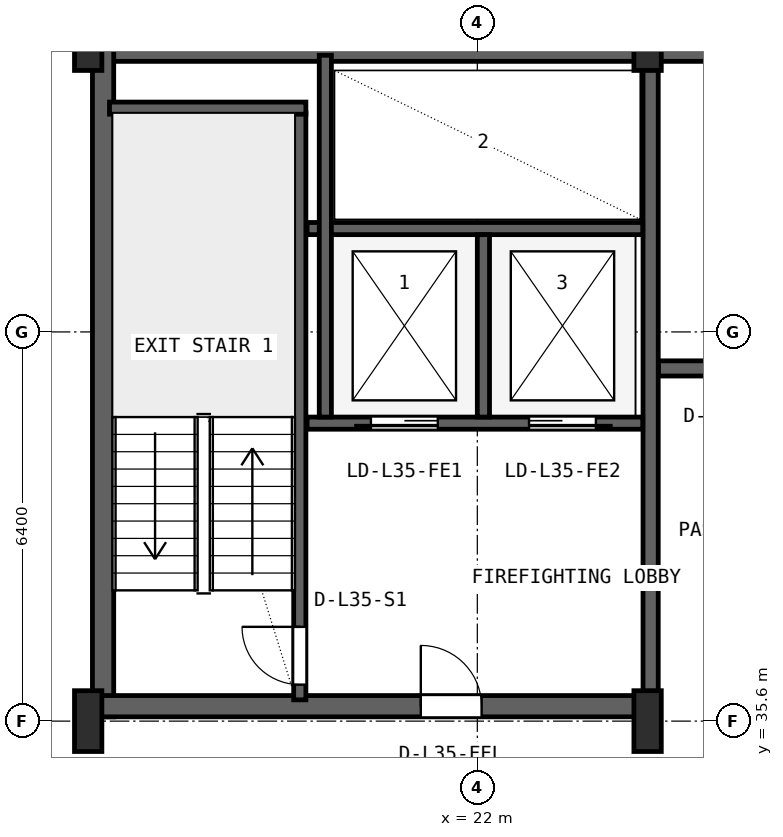
"""IFC4 building model, lengths in metres.
Left out: names, types, materials, properties, quantities, classifications, styles, units other than length and angle.
Written with IfcOpenShell. Run it as: python <this file> out.ifc"""

import sys

from ifc_helpers import new_model, si_unit, direction, frame, frame_2d, origin, origin_2d, place, context, subcontext, project, spatial, rectangle, i_section, extrude, source, transform, mapped, element, fill, save


model = new_model("IFC4")
c1 = context("Model", 3, precision=1e-05, world=origin(), true_north=direction((0.0, 1.0)))
c2 = subcontext(c1, "Body", "Model", "MODEL_VIEW")
j1 = project(units=[si_unit("LENGTHUNIT", "METRE"), si_unit("PLANEANGLEUNIT", "RADIAN")], contexts=[c1])
p1 = place(None, origin())
s1 = spatial("IfcSite", under=j1, at=p1, CompositionType="ELEMENT")
p2 = place(p1, origin())
s2 = spatial("IfcBuilding", under=s1, at=p2, CompositionType="ELEMENT")
p3 = place(p2, frame((0.0, 0.0, 145.8)))
s3 = spatial("IfcBuildingStorey", under=s2, at=p3, CompositionType="ELEMENT", Elevation=145.8)
p4 = place(p3, frame((15.6, 46.625, 0.0), z_axis=(0.0, 0.0, 1.0), x_axis=(1.0, 0.0, 0.0)))
e1 = element("IfcWall", 1, at=p4, inside=s3, PredefinedType="SHEAR", context=c2, shape_type="SweptSolid", body=[
    extrude(rectangle(XDim=36.8, YDim=0.35, at=frame_2d((18.4, 0.0))), origin(), (0.0, 0.0, 1.0), 3.55),
])
p5 = place(p3, frame((15.845, 35.67, 0.0), z_axis=(0.0, 0.0, 1.0), x_axis=(0.0, 1.0, 0.0)))
e2 = element("IfcWall", 2, at=p5, inside=s3, PredefinedType="SHEAR", context=c2, shape_type="SweptSolid", body=[
    extrude(rectangle(XDim=11.13, YDim=0.35, at=frame_2d((5.565, 0.0))), origin(), (0.0, 0.0, 1.0), 3.55),
])
p6 = place(p3, frame((15.67, 35.845, 0.0), z_axis=(0.0, 0.0, 1.0), x_axis=(1.0, 0.0, 0.0)))
e3 = element("IfcWall", 3, at=p6, inside=s3, PredefinedType="SHEAR", context=c2, shape_type="SweptSolid", body=[
    extrude(rectangle(XDim=9.13, YDim=0.35, at=frame_2d((4.565, 0.0))), origin(), (0.0, 0.0, 1.0), 3.55),
])
p7 = place(p6, frame((5.4, 0.0, 0.0)))
e4 = element("IfcOpeningElement", 4, at=p7, cuts=e3, PredefinedType="OPENING", context=c2, shape_type="SweptSolid", body=[
    extrude(rectangle(XDim=1.0, YDim=2.1, at=frame_2d((0.5, 1.05))), frame((0.0, 0.185, 0.0), z_axis=(0.0, -1.0, 0.0), x_axis=(1.0, 0.0, 0.0)), (0.0, 0.0, 1.0), 0.37),
])
m1 = source(origin(), c2, "Body", "SweptSolid", [
    extrude(i_section(OverallWidth=0.45, OverallDepth=1.0, WebThickness=0.016, FlangeThickness=0.03, FilletRadius=0.016, at=origin_2d()), origin(), (0.0, 0.0, 1.0), 3.8),
])
for number, where, z_axis, x_axis in (
    (5, (15.6, 35.6, 0.0), (0.0, 0.0, 1.0), (1.0, 0.0, 0.0)),
    (6, (15.6, 46.8, 0.0), (0.0, 0.0, 1.0), (1.0, 0.0, 0.0)),
    (7, (24.8, 35.6, 0.0), (0.0, 0.0, 1.0), (1.0, 0.0, 0.0)),
    (8, (24.8, 46.8, 0.0), (0.0, 0.0, 1.0), (1.0, 0.0, 0.0)),
):
    element("IfcColumn", number, at=place(p3, frame(where, z_axis=z_axis, x_axis=x_axis)), inside=s3, PredefinedType="COLUMN", context=c2, shape_type="MappedRepresentation", body=[
        mapped(m1, transform((0.0, 0.0, 0.0), x_axis=(1.0, 0.0, 0.0), y_axis=(0.0, 1.0, 0.0), z_axis=(0.0, 0.0, 1.0), scale=1.0)),
    ])
p8 = place(p3, frame((19.08, 35.95, 0.0), z_axis=(0.0, 0.0, 1.0), x_axis=(0.0, 1.0, 0.0)))
e9 = element("IfcWall", 9, at=p8, inside=s3, PredefinedType="SHEAR", context=c2, shape_type="SweptSolid", body=[
    extrude(rectangle(XDim=9.65, YDim=0.2, at=frame_2d((4.825, 0.0))), origin(), (0.0, 0.0, 1.0), 3.55),
])
p9 = place(p8, frame((0.25, 0.0, 0.0)))
e10 = element("IfcOpeningElement", 10, at=p9, cuts=e9, PredefinedType="OPENING", context=c2, shape_type="SweptSolid", body=[
    extrude(rectangle(XDim=0.95, YDim=2.1, at=frame_2d((0.475, 1.05))), frame((0.0, 0.11, 0.0), z_axis=(0.0, -1.0, 0.0), x_axis=(1.0, 0.0, 0.0)), (0.0, 0.0, 1.0), 0.22),
])
p10 = place(p3, frame((15.95, 45.68, 0.0), z_axis=(0.0, 0.0, 1.0), x_axis=(1.0, 0.0, 0.0)))
e11 = element("IfcWall", 11, at=p10, inside=s3, PredefinedType="SHEAR", context=c2, shape_type="SweptSolid", body=[
    extrude(rectangle(XDim=3.23, YDim=0.2, at=frame_2d((1.615, 0.0))), origin(), (0.0, 0.0, 1.0), 3.55),
])
p11 = place(p3, frame((24.85, 36.05, 0.0), z_axis=(0.0, 0.0, 1.0), x_axis=(0.0, 1.0, 0.0)))
e12 = element("IfcWall", 12, at=p11, inside=s3, PredefinedType="SHEAR", context=c2, shape_type="SweptSolid", body=[
    extrude(rectangle(XDim=10.45, YDim=0.25, at=frame_2d((5.225, 0.0))), origin(), (0.0, 0.0, 1.0), 3.55),
])
p12 = place(p3, frame((19.2, 40.5, 0.0), z_axis=(0.0, 0.0, 1.0), x_axis=(1.0, 0.0, 0.0)))
e13 = element("IfcWall", 13, at=p12, inside=s3, PredefinedType="SHEAR", context=c2, shape_type="SweptSolid", body=[
    extrude(rectangle(XDim=5.52, YDim=0.2, at=frame_2d((2.76, 0.0))), origin(), (0.0, 0.0, 1.0), 3.55),
])
p13 = place(p12, frame((1.05, 0.0, 0.0)))
e14 = element("IfcOpeningElement", 14, at=p13, cuts=e13, PredefinedType="OPENING", context=c2, shape_type="SweptSolid", body=[
    extrude(rectangle(XDim=1.1, YDim=2.18, at=frame_2d((0.55, 1.09))), frame((0.0, 0.11, 0.0), z_axis=(0.0, -1.0, 0.0), x_axis=(1.0, 0.0, 0.0)), (0.0, 0.0, 1.0), 0.22),
])
p14 = place(p12, frame((3.65, 0.0, 0.0)))
e15 = element("IfcOpeningElement", 15, at=p14, cuts=e13, PredefinedType="OPENING", context=c2, shape_type="SweptSolid", body=[
    extrude(rectangle(XDim=1.1, YDim=2.18, at=frame_2d((0.55, 1.09))), frame((0.0, 0.11, 0.0), z_axis=(0.0, -1.0, 0.0), x_axis=(1.0, 0.0, 0.0)), (0.0, 0.0, 1.0), 0.22),
])
p15 = place(p3, frame((19.2, 43.7, 0.0), z_axis=(0.0, 0.0, 1.0), x_axis=(1.0, 0.0, 0.0)))
e16 = element("IfcWall", 16, at=p15, inside=s3, PredefinedType="SHEAR", context=c2, shape_type="SweptSolid", body=[
    extrude(rectangle(XDim=5.52, YDim=0.2, at=frame_2d((2.76, 0.0))), origin(), (0.0, 0.0, 1.0), 3.55),
])
p16 = place(p3, frame((22.1, 40.6, 0.0), z_axis=(0.0, 0.0, 1.0), x_axis=(0.0, 1.0, 0.0)))
e17 = element("IfcWall", 17, at=p16, inside=s3, PredefinedType="SHEAR", context=c2, shape_type="SweptSolid", body=[
    extrude(rectangle(XDim=3.0, YDim=0.2, at=frame_2d((1.5, 0.0))), origin(), (0.0, 0.0, 1.0), 3.55),
])
p17 = place(p3, frame((19.5, 40.6, 0.0), z_axis=(0.0, 0.0, 1.0), x_axis=(0.0, 1.0, 0.0)))
e18 = element("IfcWall", 18, at=p17, inside=s3, PredefinedType="SHEAR", context=c2, shape_type="SweptSolid", body=[
    extrude(rectangle(XDim=5.95, YDim=0.2, at=frame_2d((2.975, 0.0))), origin(), (0.0, 0.0, 1.0), 3.55),
])
p18 = place(p3, frame((24.98, 41.4, 0.0), z_axis=(0.0, 0.0, 1.0), x_axis=(1.0, 0.0, 0.0)))
e19 = element("IfcWall", 19, at=p18, inside=s3, PredefinedType="SHEAR", context=c2, shape_type="SweptSolid", body=[
    extrude(rectangle(XDim=23.82, YDim=0.25, at=frame_2d((11.91, 0.0))), origin(), (0.0, 0.0, 1.0), 3.55),
])
p19 = place(p18, frame((8.87, 0.0, 0.0)))
e20 = element("IfcOpeningElement", 20, at=p19, cuts=e19, PredefinedType="OPENING", context=c2, shape_type="SweptSolid", body=[
    extrude(rectangle(XDim=1.1, YDim=2.18, at=frame_2d((0.55, 1.09))), frame((0.0, 0.135, 0.0), z_axis=(0.0, -1.0, 0.0), x_axis=(1.0, 0.0, 0.0)), (0.0, 0.0, 1.0), 0.27),
])
p20 = place(p18, frame((11.47, 0.0, 0.0)))
e21 = element("IfcOpeningElement", 21, at=p20, cuts=e19, PredefinedType="OPENING", context=c2, shape_type="SweptSolid", body=[
    extrude(rectangle(XDim=1.1, YDim=2.18, at=frame_2d((0.55, 1.09))), frame((0.0, 0.135, 0.0), z_axis=(0.0, -1.0, 0.0), x_axis=(1.0, 0.0, 0.0)), (0.0, 0.0, 1.0), 0.27),
])
p21 = place(p18, frame((14.07, 0.0, 0.0)))
e22 = element("IfcOpeningElement", 22, at=p21, cuts=e19, PredefinedType="OPENING", context=c2, shape_type="SweptSolid", body=[
    extrude(rectangle(XDim=1.1, YDim=2.18, at=frame_2d((0.55, 1.09))), frame((0.0, 0.135, 0.0), z_axis=(0.0, -1.0, 0.0), x_axis=(1.0, 0.0, 0.0)), (0.0, 0.0, 1.0), 0.27),
])
p22 = place(p18, frame((0.96, 0.0, 0.0)))
e23 = element("IfcOpeningElement", 23, at=p22, cuts=e19, PredefinedType="OPENING", context=c2, shape_type="SweptSolid", body=[
    extrude(rectangle(XDim=1.0, YDim=2.08, at=frame_2d((0.5, 1.04))), frame((0.0, 0.135, 0.0), z_axis=(0.0, -1.0, 0.0), x_axis=(1.0, 0.0, 0.0)), (0.0, 0.0, 1.0), 0.27),
])
p23 = place(p18, frame((3.56, 0.0, 0.0)))
e24 = element("IfcOpeningElement", 24, at=p23, cuts=e19, PredefinedType="OPENING", context=c2, shape_type="SweptSolid", body=[
    extrude(rectangle(XDim=1.0, YDim=2.08, at=frame_2d((0.5, 1.04))), frame((0.0, 0.135, 0.0), z_axis=(0.0, -1.0, 0.0), x_axis=(1.0, 0.0, 0.0)), (0.0, 0.0, 1.0), 0.27),
])
p24 = place(p18, frame((6.16, 0.0, 0.0)))
e25 = element("IfcOpeningElement", 25, at=p24, cuts=e19, PredefinedType="OPENING", context=c2, shape_type="SweptSolid", body=[
    extrude(rectangle(XDim=0.92, YDim=2.08, at=frame_2d((0.46, 1.04))), frame((0.0, 0.135, 0.0), z_axis=(0.0, -1.0, 0.0), x_axis=(1.0, 0.0, 0.0)), (0.0, 0.0, 1.0), 0.27),
])
m2 = source(origin(), c2, "Body", "SweptSolid", [
    extrude(rectangle(XDim=0.95, YDim=2.1, at=frame_2d((0.475, 1.05))), frame((0.0, 0.025, 0.0), z_axis=(0.0, -1.0, 0.0), x_axis=(1.0, 0.0, 0.0)), (0.0, 0.0, 1.0), 0.05),
])
p25 = place(p9, origin())
e26 = element("IfcDoor", 26, at=p25, inside=s3, OperationType="SINGLE_SWING_RIGHT", PredefinedType="DOOR", context=c2, shape_type="MappedRepresentation", body=[
    mapped(m2, transform((0.0, 0.0, 0.0), x_axis=(1.0, 0.0, 0.0), y_axis=(0.0, 1.0, 0.0), z_axis=(0.0, 0.0, 1.0), scale=1.0)),
])
fill(e10, e26)
m3 = source(origin(), c2, "Body", "SweptSolid", [
    extrude(rectangle(XDim=1.0, YDim=2.1, at=frame_2d((0.5, 1.05))), frame((0.0, 0.025, 0.0), z_axis=(0.0, -1.0, 0.0), x_axis=(1.0, 0.0, 0.0)), (0.0, 0.0, 1.0), 0.05),
])
p26 = place(p7, origin())
e27 = element("IfcDoor", 27, at=p26, inside=s3, OperationType="SINGLE_SWING_LEFT", PredefinedType="DOOR", context=c2, shape_type="MappedRepresentation", body=[
    mapped(m3, transform((0.0, 0.0, 0.0), x_axis=(1.0, 0.0, 0.0), y_axis=(0.0, 1.0, 0.0), z_axis=(0.0, 0.0, 1.0), scale=1.0)),
])
fill(e4, e27)
m4 = source(origin(), c2, "Body", "SweptSolid", [
    extrude(rectangle(XDim=1.1, YDim=2.18, at=frame_2d((0.55, 1.09))), frame((0.0, 0.025, 0.0), z_axis=(0.0, -1.0, 0.0), x_axis=(1.0, 0.0, 0.0)), (0.0, 0.0, 1.0), 0.05),
])
p27 = place(p13, frame((1.1, 0.0, 0.0), z_axis=(0.0, 0.0, 1.0), x_axis=(-1.0, 0.0, 0.0)))
e28 = element("IfcDoor", 28, at=p27, inside=s3, OperationType="SLIDING_TO_LEFT", PredefinedType="DOOR", context=c2, shape_type="MappedRepresentation", body=[
    mapped(m4, transform((0.0, 0.0, 0.0), x_axis=(1.0, 0.0, 0.0), y_axis=(0.0, 1.0, 0.0), z_axis=(0.0, 0.0, 1.0), scale=1.0)),
])
fill(e14, e28)
p28 = place(p14, frame((1.1, 0.0, 0.0), z_axis=(0.0, 0.0, 1.0), x_axis=(-1.0, 0.0, 0.0)))
e29 = element("IfcDoor", 29, at=p28, inside=s3, OperationType="SLIDING_TO_RIGHT", PredefinedType="DOOR", context=c2, shape_type="MappedRepresentation", body=[
    mapped(m4, transform((0.0, 0.0, 0.0), x_axis=(1.0, 0.0, 0.0), y_axis=(0.0, 1.0, 0.0), z_axis=(0.0, 0.0, 1.0), scale=1.0)),
])
fill(e15, e29)
save(model, sys.argv[1])
